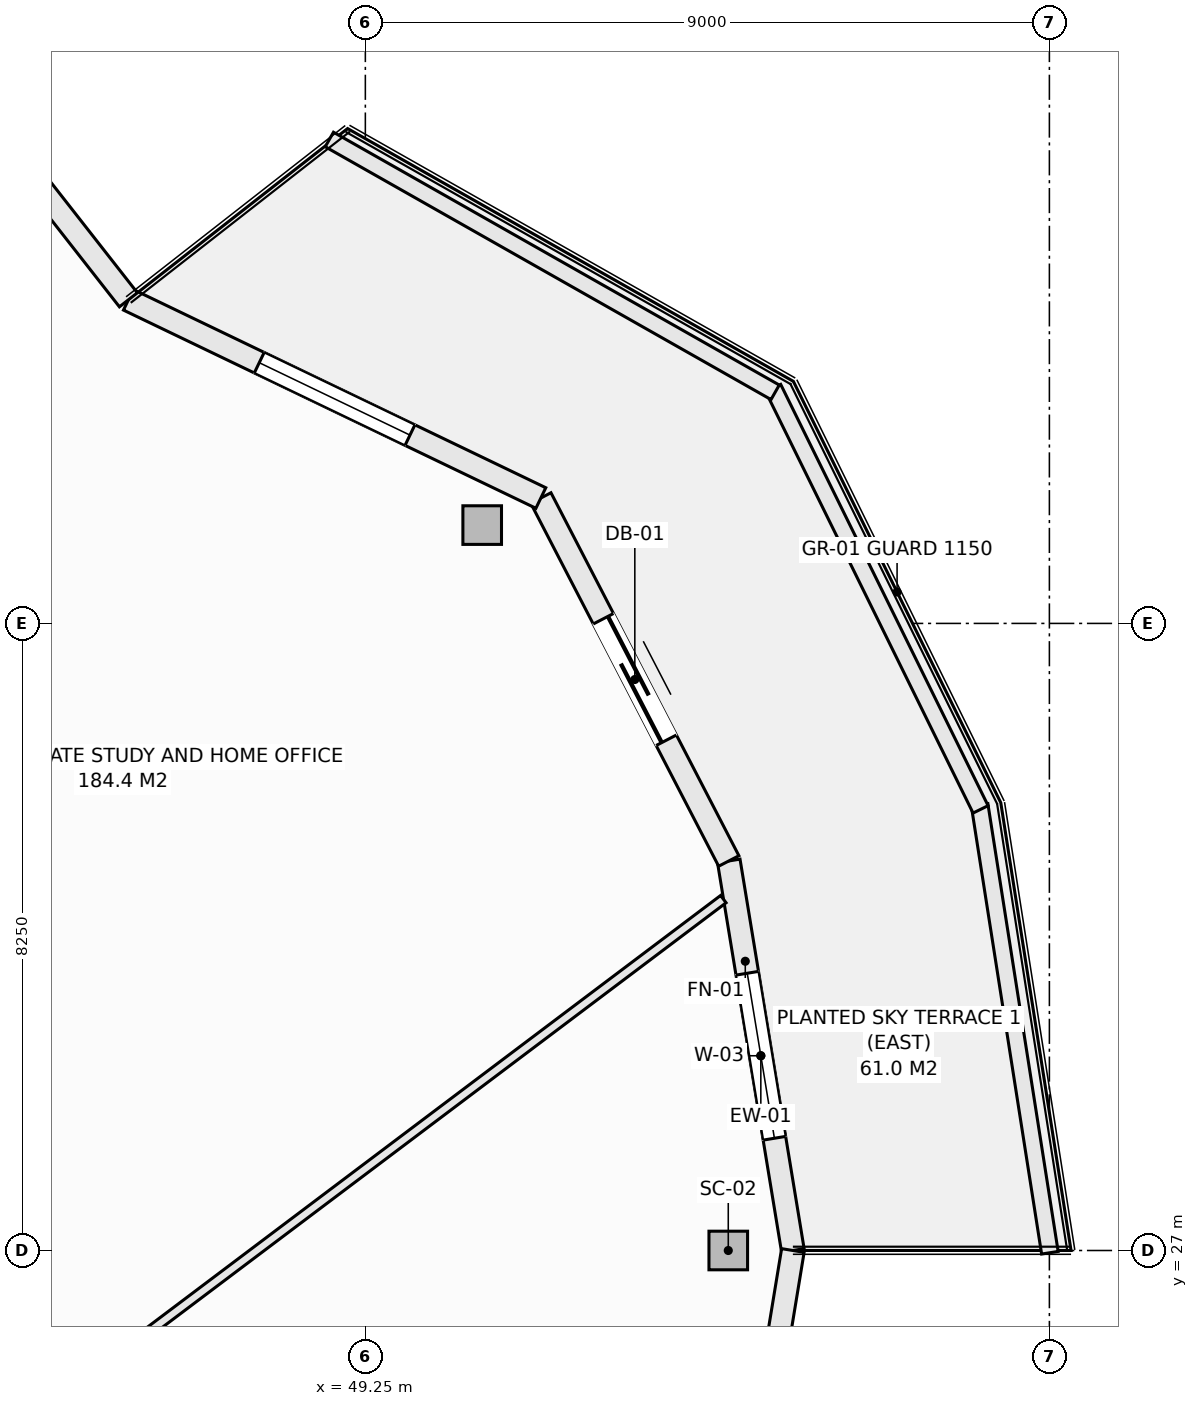
"""IFC4 building model, lengths in metres.
Left out: names, types, materials, properties, quantities, classifications, styles, units other than length and angle.
Written with IfcOpenShell. Run it as: python <this file> out.ifc"""

import sys

from ifc_helpers import new_model, si_unit, direction, frame, frame_2d, origin, origin_2d, place, context, subcontext, project, spatial, rectangle, hollow_rectangle, extrude, element, fill, save


model = new_model("IFC4")
c1 = context("Model", 3, precision=1e-05, world=origin(), true_north=direction((0.0, 1.0)))
c2 = subcontext(c1, "Body", "Model", "MODEL_VIEW")
j1 = project(units=[si_unit("LENGTHUNIT", "METRE"), si_unit("PLANEANGLEUNIT", "RADIAN")], contexts=[c1])
p1 = place(None, origin())
s1 = spatial("IfcSite", under=j1, at=p1, CompositionType="ELEMENT")
p2 = place(p1, origin())
s2 = spatial("IfcBuilding", under=s1, at=p2, CompositionType="ELEMENT")
p3 = place(p2, frame((0.0, 0.0, 196.4)))
s3 = spatial("IfcBuildingStorey", under=s2, at=p3, CompositionType="ELEMENT", Elevation=196.4)
for number, where, z_axis, x_axis in (
    (1, (54.025, 27.0, -0.27), (0.0, 0.0, 1.0), (1.0, 0.0, 0.0)),
    (2, (50.787, 36.544, -0.27), (0.0, 0.0, 1.0), (1.0, 0.0, 0.0)),
):
    element("IfcColumn", number, at=place(p3, frame(where, z_axis=z_axis, x_axis=x_axis)), inside=s3, PredefinedType="COLUMN", context=c2, shape_type="SweptSolid", body=[
        extrude(hollow_rectangle(XDim=0.508, YDim=0.508, WallThickness=0.019, at=origin_2d()), origin(), (0.0, 0.0, 1.0), 3.3),
    ])
p4 = place(p3, frame((54.032, 32.125, 0.0), z_axis=(0.0, 0.0, 1.0), x_axis=(0.16237087798, -0.986729799886, 0.0)))
e3 = element("IfcWall", 3, at=p4, inside=s3, PredefinedType="SOLIDWALL", context=c2, shape_type="SweptSolid", body=[
    extrude(rectangle(XDim=5.193, YDim=0.3, at=frame_2d((2.597, 0.0))), origin(), (0.0, 0.0, 1.0), 2.605),
])
p5 = place(p4, frame((1.497, 0.0, 0.72)))
e4 = element("IfcOpeningElement", 4, at=p5, cuts=e3, PredefinedType="OPENING", context=c2, shape_type="SweptSolid", body=[
    extrude(rectangle(XDim=2.2, YDim=1.65, at=frame_2d((1.1, 0.825))), frame((0.0, 0.16, 0.0), z_axis=(0.0, -1.0, 0.0), x_axis=(1.0, 0.0, 0.0)), (0.0, 0.0, 1.0), 0.32),
])
p6 = place(p3, frame((51.559, 36.9, 0.0), z_axis=(0.0, 0.0, 1.0), x_axis=(0.459808219482, -0.888018243786, 0.0)))
e5 = element("IfcWall", 5, at=p6, inside=s3, PredefinedType="SOLIDWALL", context=c2, shape_type="SweptSolid", body=[
    extrude(rectangle(XDim=5.378, YDim=0.3, at=frame_2d((2.689, 0.0))), origin(), (0.0, 0.0, 1.0), 2.605),
])
p7 = place(p6, frame((1.789, 0.0, 0.0)))
e6 = element("IfcOpeningElement", 6, at=p7, cuts=e5, PredefinedType="OPENING", context=c2, shape_type="SweptSolid", body=[
    extrude(rectangle(XDim=1.8, YDim=2.25, at=frame_2d((0.9, 1.125))), frame((0.0, 0.16, 0.0), z_axis=(0.0, -1.0, 0.0), x_axis=(1.0, 0.0, 0.0)), (0.0, 0.0, 1.0), 0.32),
])
p8 = place(p3, frame((46.133, 39.507, 0.0), z_axis=(0.0, 0.0, 1.0), x_axis=(0.901348331142, -0.433094892545, 0.0)))
e7 = element("IfcWall", 7, at=p8, inside=s3, PredefinedType="SOLIDWALL", context=c2, shape_type="SweptSolid", body=[
    extrude(rectangle(XDim=6.021, YDim=0.3, at=frame_2d((3.01, 0.0))), origin(), (0.0, 0.0, 1.0), 2.605),
])
p9 = place(p8, frame((1.91, 0.0, 0.72)))
e8 = element("IfcOpeningElement", 8, at=p9, cuts=e7, PredefinedType="OPENING", context=c2, shape_type="SweptSolid", body=[
    extrude(rectangle(XDim=2.2, YDim=1.65, at=frame_2d((1.1, 0.825))), frame((0.0, 0.16, 0.0), z_axis=(0.0, -1.0, 0.0), x_axis=(1.0, 0.0, 0.0)), (0.0, 0.0, 1.0), 0.32),
])
p10 = place(p3, frame((42.5, 44.147, 0.0), z_axis=(0.0, 0.0, 1.0), x_axis=(0.616450126935, -0.787393955401, 0.0)))
e9 = element("IfcWall", 9, at=p10, inside=s3, PredefinedType="SOLIDWALL", context=c2, shape_type="SweptSolid", body=[
    extrude(rectangle(XDim=5.893, YDim=0.3, at=frame_2d((2.946, 0.0))), origin(), (0.0, 0.0, 1.0), 2.605),
])
p11 = place(p10, frame((1.846, 0.0, 0.72)))
e10 = element("IfcOpeningElement", 10, at=p11, cuts=e9, PredefinedType="OPENING", context=c2, shape_type="SweptSolid", body=[
    extrude(rectangle(XDim=2.2, YDim=1.65, at=frame_2d((1.1, 0.825))), frame((0.0, 0.16, 0.0), z_axis=(0.0, -1.0, 0.0), x_axis=(1.0, 0.0, 0.0)), (0.0, 0.0, 1.0), 0.32),
])
p12 = place(p3, frame((54.032, 21.875, 0.0), z_axis=(0.0, 0.0, 1.0), x_axis=(0.16237087798, 0.986729799886, 0.0)))
e11 = element("IfcWall", 11, at=p12, inside=s3, PredefinedType="SOLIDWALL", context=c2, shape_type="SweptSolid", body=[
    extrude(rectangle(XDim=5.193, YDim=0.3, at=frame_2d((2.597, 0.0))), origin(), (0.0, 0.0, 1.0), 2.605),
])
p13 = place(p12, frame((1.497, 0.0, 0.72)))
e12 = element("IfcOpeningElement", 12, at=p13, cuts=e11, PredefinedType="OPENING", context=c2, shape_type="SweptSolid", body=[
    extrude(rectangle(XDim=2.2, YDim=1.65, at=frame_2d((1.1, 0.825))), frame((0.0, 0.16, 0.0), z_axis=(0.0, -1.0, 0.0), x_axis=(1.0, 0.0, 0.0)), (0.0, 0.0, 1.0), 0.32),
])
p14 = place(p3, frame((57.332, 32.862, 0.0), z_axis=(0.0, 0.0, 1.0), x_axis=(0.1550711793, -0.987903299595, 0.0)))
e13 = element("IfcWall", 13, at=p14, inside=s3, PredefinedType="PARAPET", context=c2, shape_type="SweptSolid", body=[
    extrude(rectangle(XDim=5.964, YDim=0.22, at=frame_2d((2.982, 0.0))), origin(), (0.0, 0.0, 1.0), 0.52),
])
p15 = place(p3, frame((54.616, 38.347, 0.0), z_axis=(0.0, 0.0, 1.0), x_axis=(0.441640961804, -0.897191875162, 0.0)))
e14 = element("IfcWall", 14, at=p15, inside=s3, PredefinedType="PARAPET", context=c2, shape_type="SweptSolid", body=[
    extrude(rectangle(XDim=6.178, YDim=0.22, at=frame_2d((3.089, 0.0))), origin(), (0.0, 0.0, 1.0), 0.52),
])
p16 = place(p3, frame((48.776, 41.617, 0.0), z_axis=(0.0, 0.0, 1.0), x_axis=(0.869860619267, -0.493297580623, 0.0)))
e15 = element("IfcWall", 15, at=p16, inside=s3, PredefinedType="PARAPET", context=c2, shape_type="SweptSolid", body=[
    extrude(rectangle(XDim=6.743, YDim=0.22, at=frame_2d((3.371, 0.0))), origin(), (0.0, 0.0, 1.0), 0.52),
])
p17 = place(p3, frame((40.453, 21.451, 0.0), z_axis=(0.0, 0.0, 1.0), x_axis=(0.798820239576, 0.601569800475, 0.0)))
e16 = element("IfcWall", 16, at=p17, inside=s3, PredefinedType="PARTITIONING", context=c2, shape_type="SweptSolid", body=[
    extrude(rectangle(XDim=16.908, YDim=0.12, at=frame_2d((8.454, 0.0))), origin(), (0.0, 0.0, 1.0), 2.478),
])
p18 = place(p5, origin())
e17 = element("IfcWindow", 17, at=p18, inside=s3, PartitioningType="SINGLE_PANEL", PredefinedType="WINDOW", context=c2, shape_type="SweptSolid", body=[
    extrude(rectangle(XDim=2.2, YDim=1.65, at=frame_2d((1.1, 0.825))), frame((0.0, 0.03, 0.0), z_axis=(0.0, -1.0, 0.0), x_axis=(1.0, 0.0, 0.0)), (0.0, 0.0, 1.0), 0.06),
])
fill(e4, e17)
p19 = place(p7, origin())
e18 = element("IfcDoor", 18, at=p19, inside=s3, OperationType="SLIDING_TO_LEFT", PredefinedType="DOOR", context=c2, shape_type="SweptSolid", body=[
    extrude(rectangle(XDim=1.8, YDim=2.25, at=frame_2d((0.9, 1.125))), frame((0.0, 0.025, 0.0), z_axis=(0.0, -1.0, 0.0), x_axis=(1.0, 0.0, 0.0)), (0.0, 0.0, 1.0), 0.05),
])
fill(e6, e18)
p20 = place(p9, origin())
e19 = element("IfcWindow", 19, at=p20, inside=s3, PartitioningType="SINGLE_PANEL", PredefinedType="WINDOW", context=c2, shape_type="SweptSolid", body=[
    extrude(rectangle(XDim=2.2, YDim=1.65, at=frame_2d((1.1, 0.825))), frame((0.0, 0.03, 0.0), z_axis=(0.0, -1.0, 0.0), x_axis=(1.0, 0.0, 0.0)), (0.0, 0.0, 1.0), 0.06),
])
fill(e8, e19)
save(model, sys.argv[1])
